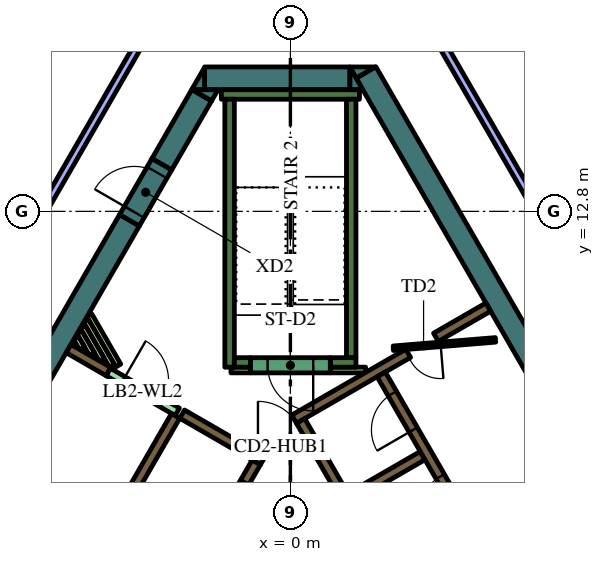
"""IFC4 building model, lengths in metres.
Left out: names, types, materials, properties, quantities, classifications, styles, units other than length and angle.
Written with IfcOpenShell. Run it as: python <this file> out.ifc"""

import sys

from ifc_helpers import new_model, si_unit, direction, frame, frame_2d, origin, place, context, subcontext, project, spatial, polyline, rectangle, outline, extrude, element, fill, save


model = new_model("IFC4")
c1 = context("Model", 3, precision=1e-05, world=origin(), true_north=direction((0.0, 1.0)))
c2 = subcontext(c1, "Body", "Model", "MODEL_VIEW")
j1 = project(units=[si_unit("LENGTHUNIT", "METRE"), si_unit("PLANEANGLEUNIT", "RADIAN")], contexts=[c1])
p1 = place(None, origin())
s1 = spatial("IfcSite", under=j1, at=p1, CompositionType="ELEMENT")
p2 = place(p1, origin())
s2 = spatial("IfcBuilding", under=s1, at=p2, CompositionType="ELEMENT")
p3 = place(p2, frame((0.0, 0.0, 275.4)))
s3 = spatial("IfcBuildingStorey", under=s2, at=p3, CompositionType="ELEMENT", Elevation=275.4)
p4 = place(p3, frame((1.989, 16.456, 0.0), z_axis=(0.0, 0.0, 1.0), x_axis=(0.49999102663, -0.8660305845, 0.0)))
e1 = element("IfcWall", 1, at=p4, inside=s3, PredefinedType="SOLIDWALL", context=c2, shape_type="SweptSolid", body=[
    extrude(rectangle(XDim=12.406, YDim=0.6, at=frame_2d((6.203, 0.0))), origin(), (0.0, 0.0, 1.0), 4.2),
])
p5 = place(p3, origin())
e2 = element("IfcWall", 2, at=p5, inside=s3, PredefinedType="SOLIDWALL", context=c2, shape_type="SweptSolid", body=[
    extrude(outline(polyline([(1.559, 16.6), (2.235, 16.6), (1.728, 16.307), (1.559, 16.6)])), origin(), (0.0, 0.0, 1.0), 4.2),
])
p6 = place(p3, frame((-2.258, 16.3, 0.0), z_axis=(0.0, 0.0, 1.0), x_axis=(1.0, 0.0, 0.0)))
e3 = element("IfcWall", 3, at=p6, inside=s3, PredefinedType="SOLIDWALL", context=c2, shape_type="SweptSolid", body=[
    extrude(rectangle(XDim=3.823, YDim=0.6, at=frame_2d((1.912, 0.0))), origin(), (0.0, 0.0, 1.0), 4.2),
])
e4 = element("IfcWall", 4, at=p5, inside=s3, PredefinedType="SOLIDWALL", context=c2, shape_type="SweptSolid", body=[
    extrude(outline(polyline([(1.905, 16.0), (1.567, 16.0), (1.567, 16.585), (1.905, 16.0)])), origin(), (0.0, 0.0, 1.0), 4.2),
])
e5 = element("IfcWall", 5, at=p5, inside=s3, PredefinedType="SOLIDWALL", context=c2, shape_type="SweptSolid", body=[
    extrude(outline(polyline([(-2.598, 16.0), (-2.26, 16.585), (-2.26, 16.0), (-2.598, 16.0)])), origin(), (0.0, 0.0, 1.0), 4.2),
])
p7 = place(p3, frame((-2.335, 15.855, 0.0), z_axis=(0.0, 0.0, 1.0), x_axis=(-0.499980971027, -0.866036389889, 0.0)))
e6 = element("IfcWall", 6, at=p7, inside=s3, PredefinedType="SOLIDWALL", context=c2, shape_type="SweptSolid", body=[
    extrude(rectangle(XDim=2.098, YDim=0.6, at=frame_2d((1.049, 0.0))), origin(), (0.0, 0.0, 1.0), 4.2),
])
e7 = element("IfcWall", 7, at=p5, inside=s3, PredefinedType="SOLIDWALL", context=c2, shape_type="SweptSolid", body=[
    extrude(outline(polyline([(-1.905, 16.0), (-2.074, 15.707), (-2.581, 16.0), (-1.905, 16.0)])), origin(), (0.0, 0.0, 1.0), 4.2),
])
p8 = place(p3, frame((-4.234, 12.566, 0.0), z_axis=(0.0, 0.0, 1.0), x_axis=(-0.499998841866, -0.866026072432, 0.0)))
e8 = element("IfcWall", 8, at=p8, inside=s3, PredefinedType="SOLIDWALL", context=c2, shape_type="SweptSolid", body=[
    extrude(rectangle(XDim=16.694, YDim=0.6, at=frame_2d((8.347, 0.0))), origin(), (0.0, 0.0, 1.0), 4.2),
])
p9 = place(p3, frame((-1.817, 15.875, 0.0), z_axis=(0.0, 0.0, 1.0), x_axis=(1.0, 0.0, 0.0)))
e9 = element("IfcWall", 9, at=p9, inside=s3, PredefinedType="SOLIDWALL", context=c2, shape_type="SweptSolid", body=[
    extrude(rectangle(XDim=3.634, YDim=0.25, at=frame_2d((1.817, 0.0))), origin(), (0.0, 0.0, 1.0), 4.2),
])
p10 = place(p3, frame((1.6, 8.95, 0.0), z_axis=(0.0, 0.0, 1.0), x_axis=(0.0, 1.0, 0.0)))
e10 = element("IfcWall", 10, at=p10, inside=s3, PredefinedType="SOLIDWALL", context=c2, shape_type="SweptSolid", body=[
    extrude(rectangle(XDim=6.8, YDim=0.25, at=frame_2d((3.4, 0.0))), origin(), (0.0, 0.0, 1.0), 4.2),
])
p11 = place(p3, frame((1.05, 8.825, 0.0), z_axis=(0.0, 0.0, 1.0), x_axis=(1.0, 0.0, 0.0)))
e11 = element("IfcWall", 11, at=p11, inside=s3, PredefinedType="SOLIDWALL", context=c2, shape_type="SweptSolid", body=[
    extrude(rectangle(XDim=0.675, YDim=0.25, at=frame_2d((0.337, 0.0))), origin(), (0.0, 0.0, 1.0), 4.2),
])
p12 = place(p3, frame((-1.6, 8.7, 0.0), z_axis=(0.0, 0.0, 1.0), x_axis=(0.0, 1.0, 0.0)))
e12 = element("IfcWall", 12, at=p12, inside=s3, PredefinedType="SOLIDWALL", context=c2, shape_type="SweptSolid", body=[
    extrude(rectangle(XDim=7.05, YDim=0.25, at=frame_2d((3.525, 0.0))), origin(), (0.0, 0.0, 1.0), 4.2),
])
p13 = place(p3, frame((-1.475, 8.825, 0.0), z_axis=(0.0, 0.0, 1.0), x_axis=(1.0, 0.0, 0.0)))
e13 = element("IfcWall", 13, at=p13, inside=s3, PredefinedType="SOLIDWALL", context=c2, shape_type="SweptSolid", body=[
    extrude(rectangle(XDim=0.425, YDim=0.25, at=frame_2d((0.212, 0.0))), origin(), (0.0, 0.0, 1.0), 4.2),
])
p14 = place(p3, frame((3.1, 9.064, 0.0), z_axis=(0.0, 0.0, 1.0), x_axis=(-0.866033137035, -0.499986605379, 0.0)))
e14 = element("IfcWall", 14, at=p14, inside=s3, PredefinedType="SOLIDWALL", context=c2, shape_type="SweptSolid", body=[
    extrude(rectangle(XDim=3.467, YDim=0.25, at=frame_2d((1.733, 0.0))), origin(), (0.0, 0.0, 1.0), 4.2),
])
p15 = place(p3, frame((0.268, 7.285, 0.0), z_axis=(0.0, 0.0, 1.0), x_axis=(0.500098681536, -0.865968422476, 0.0)))
e15 = element("IfcWall", 15, at=p15, inside=s3, PredefinedType="SOLIDWALL", context=c2, shape_type="SweptSolid", body=[
    extrude(rectangle(XDim=0.636, YDim=0.25, at=frame_2d((0.318, 0.0))), origin(), (0.0, 0.0, 1.0), 4.2),
])
p16 = place(p3, frame((5.97, -2.591, 0.0), z_axis=(0.0, 0.0, 1.0), x_axis=(-0.499994469932, 0.866028596547, 0.0)))
e16 = element("IfcWall", 16, at=p16, inside=s3, PredefinedType="SOLIDWALL", context=c2, shape_type="SweptSolid", body=[
    extrude(rectangle(XDim=10.488, YDim=0.25, at=frame_2d((5.244, 0.0))), origin(), (0.0, 0.0, 1.0), 4.2),
])
p17 = place(p3, frame((1.574, 5.274, 0.0), z_axis=(0.0, 0.0, 1.0), x_axis=(0.866028486751, 0.499994660107, 0.0)))
e17 = element("IfcWall", 17, at=p17, inside=s3, PredefinedType="SOLIDWALL", context=c2, shape_type="SweptSolid", body=[
    extrude(rectangle(XDim=2.2, YDim=0.25, at=frame_2d((1.1, 0.0))), origin(), (0.0, 0.0, 1.0), 4.2),
])
p18 = place(p3, frame((3.83, 9.486, 0.0), z_axis=(0.0, 0.0, 1.0), x_axis=(0.865986202621, 0.500067892261, 0.0)))
e18 = element("IfcWall", 18, at=p18, inside=s3, PredefinedType="SOLIDWALL", context=c2, shape_type="SweptSolid", body=[
    extrude(rectangle(XDim=1.591, YDim=0.25, at=frame_2d((0.795, 0.0))), origin(), (0.0, 0.0, 1.0), 4.2),
])
p19 = place(p3, frame((-3.02, 7.419, 0.0), z_axis=(0.0, 0.0, 1.0), x_axis=(-0.500022956343, -0.866012149528, 0.0)))
e19 = element("IfcWall", 19, at=p19, inside=s3, PredefinedType="SOLIDWALL", context=c2, shape_type="SweptSolid", body=[
    extrude(rectangle(XDim=10.08, YDim=0.25, at=frame_2d((5.04, 0.0))), origin(), (0.0, 0.0, 1.0), 4.2),
])
e20 = element("IfcWall", 20, at=p5, inside=s3, PredefinedType="SOLIDWALL", context=c2, shape_type="SweptSolid", body=[
    extrude(outline(polyline([(-2.912, 7.356), (-2.787, 7.573), (-1.232, 6.675), (-1.303, 6.675), (-1.304, 6.675), (-1.304, 6.675), (-1.304, 6.525), (-1.304, 6.525), (-1.303, 6.525), (-0.971, 6.525), (-0.665, 6.348), (-0.79, 6.132), (-1.007, 6.257), (-1.007, 6.257), (-2.912, 7.356)])), origin(), (0.0, 0.0, 1.0), 4.2),
])
p20 = place(p3, frame((-5.837, 9.19, 0.0), z_axis=(0.0, 0.0, 1.0), x_axis=(0.866024298998, -0.500001913541, 0.0)))
e21 = element("IfcWall", 21, at=p20, inside=s3, PredefinedType="SOLIDWALL", context=c2, shape_type="SweptSolid", body=[
    extrude(rectangle(XDim=1.21, YDim=0.25, at=frame_2d((0.605, 0.0))), origin(), (0.0, 0.0, 1.0), 4.2),
])
p21 = place(p3, frame((-5.294, 10.067, 0.0), z_axis=(0.0, 0.0, 1.0), x_axis=(0.500054140411, -0.865994143547, 0.0)))
e22 = element("IfcWall", 22, at=p21, inside=s3, PredefinedType="PARTITIONING", context=c2, shape_type="SweptSolid", body=[
    extrude(rectangle(XDim=1.529, YDim=0.15, at=frame_2d((0.765, 0.0))), origin(), (0.0, 0.0, 1.0), 3.55),
])
p22 = place(p3, frame((-5.381, 9.917, 0.0), z_axis=(0.0, 0.0, 1.0), x_axis=(0.500136970483, -0.865946309396, 0.0)))
e23 = element("IfcWall", 23, at=p22, inside=s3, PredefinedType="PARTITIONING", context=c2, shape_type="SweptSolid", body=[
    extrude(rectangle(XDim=1.359, YDim=0.15, at=frame_2d((0.68, 0.0))), origin(), (0.0, 0.0, 1.0), 3.55),
])
p23 = place(p3, frame((-5.467, 9.767, 0.0), z_axis=(0.0, 0.0, 1.0), x_axis=(0.500168849293, -0.86592789665, 0.0)))
e24 = element("IfcWall", 24, at=p23, inside=s3, PredefinedType="PARTITIONING", context=c2, shape_type="SweptSolid", body=[
    extrude(rectangle(XDim=1.01, YDim=0.15, at=frame_2d((0.505, 0.0))), origin(), (0.0, 0.0, 1.0), 3.55),
])
p24 = place(p3, frame((-5.554, 9.617, 0.0), z_axis=(0.0, 0.0, 1.0), x_axis=(0.500253084543, -0.86587923604, 0.0)))
e25 = element("IfcWall", 25, at=p24, inside=s3, PredefinedType="PARTITIONING", context=c2, shape_type="SweptSolid", body=[
    extrude(rectangle(XDim=0.664, YDim=0.15, at=frame_2d((0.332, 0.0))), origin(), (0.0, 0.0, 1.0), 3.55),
])
p25 = place(p3, frame((-5.64, 9.467, 0.0), z_axis=(0.0, 0.0, 1.0), x_axis=(0.499944387978, -0.86605750902, 0.0)))
e26 = element("IfcWall", 26, at=p25, inside=s3, PredefinedType="PARTITIONING", context=c2, shape_type="SweptSolid", body=[
    extrude(rectangle(XDim=0.317, YDim=0.15, at=frame_2d((0.159, 0.0))), origin(), (0.0, 0.0, 1.0), 3.55),
])
p26 = place(p3, frame((1.05, 8.625, 0.0), z_axis=(0.0, 0.0, 1.0), x_axis=(1.0, 0.0, 0.0)))
e27 = element("IfcWall", 27, at=p26, inside=s3, PredefinedType="PARTITIONING", context=c2, shape_type="SweptSolid", body=[
    extrude(rectangle(XDim=0.929, YDim=0.15, at=frame_2d((0.464, 0.0))), origin(), (0.0, 0.0, 1.0), 3.55),
])
p27 = place(p3, frame((-1.564, 8.625, 0.0), z_axis=(0.0, 0.0, 1.0), x_axis=(1.0, 0.0, 0.0)))
e28 = element("IfcWall", 28, at=p27, inside=s3, PredefinedType="PARTITIONING", context=c2, shape_type="SweptSolid", body=[
    extrude(rectangle(XDim=0.514, YDim=0.15, at=frame_2d((0.257, 0.0))), origin(), (0.0, 0.0, 1.0), 3.55),
])
p28 = place(p3, frame((8.565, -2.185, 0.0), z_axis=(0.0, 0.0, 1.0), x_axis=(-0.499997954832, 0.866026584559, 0.0)))
e29 = element("IfcWall", 29, at=p28, inside=s3, PredefinedType="SOLIDWALL", context=c2, shape_type="SweptSolid", body=[
    extrude(rectangle(XDim=12.35, YDim=0.25, at=frame_2d((6.175, 0.0))), origin(), (0.0, 0.0, 1.0), 4.2),
])
p29 = place(p28, frame((0.685, 0.0, 0.0)))
e30 = element("IfcOpeningElement", 30, at=p29, cuts=e29, PredefinedType="OPENING", context=c2, shape_type="SweptSolid", body=[
    extrude(rectangle(XDim=0.9, YDim=2.1, at=frame_2d((0.45, 1.05))), frame((0.0, 0.135, 0.0), z_axis=(0.0, -1.0, 0.0), x_axis=(1.0, 0.0, 0.0)), (0.0, 0.0, 1.0), 0.27),
])
p30 = place(p28, frame((3.105, 0.0, 0.0)))
e31 = element("IfcOpeningElement", 31, at=p30, cuts=e29, PredefinedType="OPENING", context=c2, shape_type="SweptSolid", body=[
    extrude(rectangle(XDim=1.1, YDim=2.1, at=frame_2d((0.55, 1.05))), frame((0.0, 0.135, 0.0), z_axis=(0.0, -1.0, 0.0), x_axis=(1.0, 0.0, 0.0)), (0.0, 0.0, 1.0), 0.27),
])
p31 = place(p28, frame((5.625, 0.0, 0.0)))
e32 = element("IfcOpeningElement", 32, at=p31, cuts=e29, PredefinedType="OPENING", context=c2, shape_type="SweptSolid", body=[
    extrude(rectangle(XDim=1.1, YDim=2.1, at=frame_2d((0.55, 1.05))), frame((0.0, 0.135, 0.0), z_axis=(0.0, -1.0, 0.0), x_axis=(1.0, 0.0, 0.0)), (0.0, 0.0, 1.0), 0.27),
])
p32 = place(p28, frame((8.145, 0.0, 0.0)))
e33 = element("IfcOpeningElement", 33, at=p32, cuts=e29, PredefinedType="OPENING", context=c2, shape_type="SweptSolid", body=[
    extrude(rectangle(XDim=1.1, YDim=2.1, at=frame_2d((0.55, 1.05))), frame((0.0, 0.135, 0.0), z_axis=(0.0, -1.0, 0.0), x_axis=(1.0, 0.0, 0.0)), (0.0, 0.0, 1.0), 0.27),
])
p33 = place(p28, frame((10.665, 0.0, 0.0)))
e34 = element("IfcOpeningElement", 34, at=p33, cuts=e29, PredefinedType="OPENING", context=c2, shape_type="SweptSolid", body=[
    extrude(rectangle(XDim=1.1, YDim=2.1, at=frame_2d((0.55, 1.05))), frame((0.0, 0.135, 0.0), z_axis=(0.0, -1.0, 0.0), x_axis=(1.0, 0.0, 0.0)), (0.0, 0.0, 1.0), 0.27),
])
p34 = place(p3, frame((-0.898, 6.194, 0.0), z_axis=(0.0, 0.0, 1.0), x_axis=(-0.499996202215, -0.866027596426, 0.0)))
e35 = element("IfcWall", 35, at=p34, inside=s3, PredefinedType="SOLIDWALL", context=c2, shape_type="SweptSolid", body=[
    extrude(rectangle(XDim=9.83, YDim=0.25, at=frame_2d((4.915, 0.0))), origin(), (0.0, 0.0, 1.0), 4.2),
])
p35 = place(p34, frame((0.585, 0.0, 0.0)))
e36 = element("IfcOpeningElement", 36, at=p35, cuts=e35, PredefinedType="OPENING", context=c2, shape_type="SweptSolid", body=[
    extrude(rectangle(XDim=1.1, YDim=2.1, at=frame_2d((0.55, 1.05))), frame((0.0, 0.135, 0.0), z_axis=(0.0, -1.0, 0.0), x_axis=(1.0, 0.0, 0.0)), (0.0, 0.0, 1.0), 0.27),
])
p36 = place(p34, frame((3.105, 0.0, 0.0)))
e37 = element("IfcOpeningElement", 37, at=p36, cuts=e35, PredefinedType="OPENING", context=c2, shape_type="SweptSolid", body=[
    extrude(rectangle(XDim=1.1, YDim=2.1, at=frame_2d((0.55, 1.05))), frame((0.0, 0.135, 0.0), z_axis=(0.0, -1.0, 0.0), x_axis=(1.0, 0.0, 0.0)), (0.0, 0.0, 1.0), 0.27),
])
p37 = place(p34, frame((5.625, 0.0, 0.0)))
e38 = element("IfcOpeningElement", 38, at=p37, cuts=e35, PredefinedType="OPENING", context=c2, shape_type="SweptSolid", body=[
    extrude(rectangle(XDim=1.1, YDim=2.1, at=frame_2d((0.55, 1.05))), frame((0.0, 0.135, 0.0), z_axis=(0.0, -1.0, 0.0), x_axis=(1.0, 0.0, 0.0)), (0.0, 0.0, 1.0), 0.27),
])
p38 = place(p34, frame((8.145, 0.0, 0.0)))
e39 = element("IfcOpeningElement", 39, at=p38, cuts=e35, PredefinedType="OPENING", context=c2, shape_type="SweptSolid", body=[
    extrude(rectangle(XDim=1.1, YDim=2.1, at=frame_2d((0.55, 1.05))), frame((0.0, 0.135, 0.0), z_axis=(0.0, -1.0, 0.0), x_axis=(1.0, 0.0, 0.0)), (0.0, 0.0, 1.0), 0.27),
])
p39 = place(p3, frame((1.05, 8.75, 0.0), z_axis=(0.0, 0.0, 1.0), x_axis=(-1.0, 0.0, 0.0)))
e40 = element("IfcWall", 40, at=p39, inside=s3, PredefinedType="SOLIDWALL", context=c2, shape_type="SweptSolid", body=[
    extrude(rectangle(XDim=2.1, YDim=0.4, at=frame_2d((1.05, 0.0))), origin(), (0.0, 0.0, 1.0), 4.2),
])
p40 = place(p39, frame((0.45, 0.0, 0.0)))
e41 = element("IfcOpeningElement", 41, at=p40, cuts=e40, PredefinedType="OPENING", context=c2, shape_type="SweptSolid", body=[
    extrude(rectangle(XDim=1.2, YDim=2.1, at=frame_2d((0.6, 1.05))), frame((0.0, 0.21, 0.0), z_axis=(0.0, -1.0, 0.0), x_axis=(1.0, 0.0, 0.0)), (0.0, 0.0, 1.0), 0.42),
])
p41 = place(p3, frame((5.398, 9.419, 0.0), z_axis=(0.0, 0.0, 1.0), x_axis=(-0.996653416376, -0.081743303248, 0.0)))
e42 = element("IfcWall", 42, at=p41, inside=s3, PredefinedType="PARTITIONING", context=c2, shape_type="SweptSolid", body=[
    extrude(rectangle(XDim=2.7, YDim=0.12, at=frame_2d((1.35, 0.0))), origin(), (0.0, 0.0, 1.0), 3.55),
])
p42 = place(p41, frame((1.45, 0.0, 0.0)))
e43 = element("IfcOpeningElement", 43, at=p42, cuts=e42, PredefinedType="OPENING", context=c2, shape_type="SweptSolid", body=[
    extrude(rectangle(XDim=0.9, YDim=2.1, at=frame_2d((0.45, 1.05))), frame((0.0, 0.07, 0.0), z_axis=(0.0, -1.0, 0.0), x_axis=(1.0, 0.0, 0.0)), (0.0, 0.0, 1.0), 0.14),
])
p43 = place(p3, frame((-1.303, 6.6, 0.0), z_axis=(0.0, 0.0, 1.0), x_axis=(1.0, 0.0, 0.0)))
e44 = element("IfcWall", 44, at=p43, inside=s3, PredefinedType="PARTITIONING", context=c2, shape_type="SweptSolid", body=[
    extrude(rectangle(XDim=2.1, YDim=0.15, at=frame_2d((1.05, 0.0))), origin(), (0.0, 0.0, 1.0), 4.2),
])
p44 = place(p43, frame((0.45, 0.0, 0.0)))
e45 = element("IfcOpeningElement", 45, at=p44, cuts=e44, PredefinedType="OPENING", context=c2, shape_type="SweptSolid", body=[
    extrude(rectangle(XDim=1.2, YDim=2.1, at=frame_2d((0.6, 1.05))), frame((0.0, 0.085, 0.0), z_axis=(0.0, -1.0, 0.0), x_axis=(1.0, 0.0, 0.0)), (0.0, 0.0, 1.0), 0.17),
])
p45 = place(p3, frame((-4.796, 8.575, 0.0), z_axis=(0.0, 0.0, 1.0), x_axis=(0.866009402589, -0.500027713859, 0.0)))
e46 = element("IfcWall", 46, at=p45, inside=s3, PredefinedType="PARTITIONING", context=c2, shape_type="SweptSolid", body=[
    extrude(rectangle(XDim=2.1, YDim=0.226, at=frame_2d((1.05, 0.0))), origin(), (0.0, 0.0, 1.0), 3.55),
])
p46 = place(p45, frame((0.45, 0.0, 0.0)))
e47 = element("IfcOpeningElement", 47, at=p46, cuts=e46, PredefinedType="OPENING", context=c2, shape_type="SweptSolid", body=[
    extrude(rectangle(XDim=1.2, YDim=2.1, at=frame_2d((0.6, 1.05))), frame((0.0, 0.123, 0.0), z_axis=(0.0, -1.0, 0.0), x_axis=(1.0, 0.0, 0.0)), (0.0, 0.0, 1.0), 0.246),
])
p47 = place(p3, frame((-4.234, 12.566, 0.0), z_axis=(0.0, 0.0, 1.0), x_axis=(0.500000056704, 0.866025371046, 0.0)))
e48 = element("IfcWall", 48, at=p47, inside=s3, PredefinedType="SOLIDWALL", context=c2, shape_type="SweptSolid", body=[
    extrude(rectangle(XDim=1.7, YDim=0.6, at=frame_2d((0.85, 0.0))), origin(), (0.0, 0.0, 1.0), 4.2),
])
p48 = place(p47, frame((0.25, 0.0, 0.0)))
e49 = element("IfcOpeningElement", 49, at=p48, cuts=e48, PredefinedType="OPENING", context=c2, shape_type="SweptSolid", body=[
    extrude(rectangle(XDim=1.2, YDim=2.1, at=frame_2d((0.6, 1.05))), frame((0.0, 0.31, 0.0), z_axis=(0.0, -1.0, 0.0), x_axis=(1.0, 0.0, 0.0)), (0.0, 0.0, 1.0), 0.62),
])
p49 = place(p3, frame((7.188, 11.65, 0.0), z_axis=(0.0, 0.0, 1.0), x_axis=(-0.499989634868, 0.866031388014, 0.0)))
e50 = element("IfcWall", 50, at=p49, inside=s3, PredefinedType="PARTITIONING", context=c2, shape_type="SweptSolid", body=[
    extrude(rectangle(XDim=7.303, YDim=0.2, at=frame_2d((3.652, 0.0))), origin(), (0.0, 0.0, 1.0), 3.55),
])
p50 = place(p3, frame((-7.962, 15.8, 0.0), z_axis=(0.0, 0.0, 1.0), x_axis=(0.599528135832, 0.800353680785, 0.0)))
e51 = element("IfcWall", 51, at=p50, inside=s3, PredefinedType="PARTITIONING", context=c2, shape_type="SweptSolid", body=[
    extrude(rectangle(XDim=5.217, YDim=0.15, at=frame_2d((2.608, 0.0))), origin(), (0.0, 0.0, 1.0), 3.55),
])
p51 = place(p50, frame((2.116, 0.0, 0.0)))
e52 = element("IfcOpeningElement", 52, at=p51, cuts=e51, PredefinedType="OPENING", context=c2, shape_type="SweptSolid", body=[
    extrude(rectangle(XDim=0.9, YDim=2.1, at=frame_2d((0.45, 1.05))), frame((0.0, 0.085, 0.0), z_axis=(0.0, -1.0, 0.0), x_axis=(1.0, 0.0, 0.0)), (0.0, 0.0, 1.0), 0.17),
])
p52 = place(p3, frame((-3.306, 18.374, 0.0), z_axis=(0.0, 0.0, 1.0), x_axis=(-0.499999798456, -0.866025520146, 0.0)))
e53 = element("IfcWall", 53, at=p52, inside=s3, PredefinedType="PARTITIONING", context=c2, shape_type="SweptSolid", body=[
    extrude(rectangle(XDim=8.229, YDim=0.2, at=frame_2d((4.115, 0.0))), origin(), (0.0, 0.0, 1.0), 3.55),
])
p53 = place(p32, origin())
e54 = element("IfcDoor", 54, at=p53, inside=s3, OperationType="DOUBLE_DOOR_SLIDING", PredefinedType="DOOR", context=c2, shape_type="SweptSolid", body=[
    extrude(rectangle(XDim=1.1, YDim=2.1, at=frame_2d((0.55, 1.05))), frame((0.0, 0.025, 0.0), z_axis=(0.0, -1.0, 0.0), x_axis=(1.0, 0.0, 0.0)), (0.0, 0.0, 1.0), 0.05),
])
fill(e33, e54)
p54 = place(p33, origin())
e55 = element("IfcDoor", 55, at=p54, inside=s3, OperationType="DOUBLE_DOOR_SLIDING", PredefinedType="DOOR", context=c2, shape_type="SweptSolid", body=[
    extrude(rectangle(XDim=1.1, YDim=2.1, at=frame_2d((0.55, 1.05))), frame((0.0, 0.025, 0.0), z_axis=(0.0, -1.0, 0.0), x_axis=(1.0, 0.0, 0.0)), (0.0, 0.0, 1.0), 0.05),
])
fill(e34, e55)
p55 = place(p35, origin())
e56 = element("IfcDoor", 56, at=p55, inside=s3, OperationType="DOUBLE_DOOR_SLIDING", PredefinedType="DOOR", context=c2, shape_type="SweptSolid", body=[
    extrude(rectangle(XDim=1.1, YDim=2.1, at=frame_2d((0.55, 1.05))), frame((0.0, 0.025, 0.0), z_axis=(0.0, -1.0, 0.0), x_axis=(1.0, 0.0, 0.0)), (0.0, 0.0, 1.0), 0.05),
])
fill(e36, e56)
p56 = place(p40, origin())
e57 = element("IfcDoor", 57, at=p56, inside=s3, OperationType="SINGLE_SWING_LEFT", PredefinedType="DOOR", context=c2, shape_type="SweptSolid", body=[
    extrude(rectangle(XDim=1.2, YDim=2.1, at=frame_2d((0.6, 1.05))), frame((0.0, 0.025, 0.0), z_axis=(0.0, -1.0, 0.0), x_axis=(1.0, 0.0, 0.0)), (0.0, 0.0, 1.0), 0.05),
])
fill(e41, e57)
p57 = place(p42, origin())
e58 = element("IfcDoor", 58, at=p57, inside=s3, OperationType="SINGLE_SWING_LEFT", PredefinedType="DOOR", context=c2, shape_type="SweptSolid", body=[
    extrude(rectangle(XDim=0.9, YDim=2.1, at=frame_2d((0.45, 1.05))), frame((0.0, 0.025, 0.0), z_axis=(0.0, -1.0, 0.0), x_axis=(1.0, 0.0, 0.0)), (0.0, 0.0, 1.0), 0.05),
])
fill(e43, e58)
p58 = place(p44, origin())
e59 = element("IfcDoor", 59, at=p58, inside=s3, OperationType="SINGLE_SWING_LEFT", PredefinedType="DOOR", context=c2, shape_type="SweptSolid", body=[
    extrude(rectangle(XDim=1.2, YDim=2.1, at=frame_2d((0.6, 1.05))), frame((0.0, 0.025, 0.0), z_axis=(0.0, -1.0, 0.0), x_axis=(1.0, 0.0, 0.0)), (0.0, 0.0, 1.0), 0.05),
])
fill(e45, e59)
p59 = place(p46, origin())
e60 = element("IfcDoor", 60, at=p59, inside=s3, OperationType="SINGLE_SWING_LEFT", PredefinedType="DOOR", context=c2, shape_type="SweptSolid", body=[
    extrude(rectangle(XDim=1.2, YDim=2.1, at=frame_2d((0.6, 1.05))), frame((0.0, 0.025, 0.0), z_axis=(0.0, -1.0, 0.0), x_axis=(1.0, 0.0, 0.0)), (0.0, 0.0, 1.0), 0.05),
])
fill(e47, e60)
p60 = place(p48, origin())
e61 = element("IfcDoor", 61, at=p60, inside=s3, OperationType="SINGLE_SWING_LEFT", PredefinedType="DOOR", context=c2, shape_type="SweptSolid", body=[
    extrude(rectangle(XDim=1.2, YDim=2.1, at=frame_2d((0.6, 1.05))), frame((0.0, 0.025, 0.0), z_axis=(0.0, -1.0, 0.0), x_axis=(1.0, 0.0, 0.0)), (0.0, 0.0, 1.0), 0.05),
])
fill(e49, e61)
save(model, sys.argv[1])
